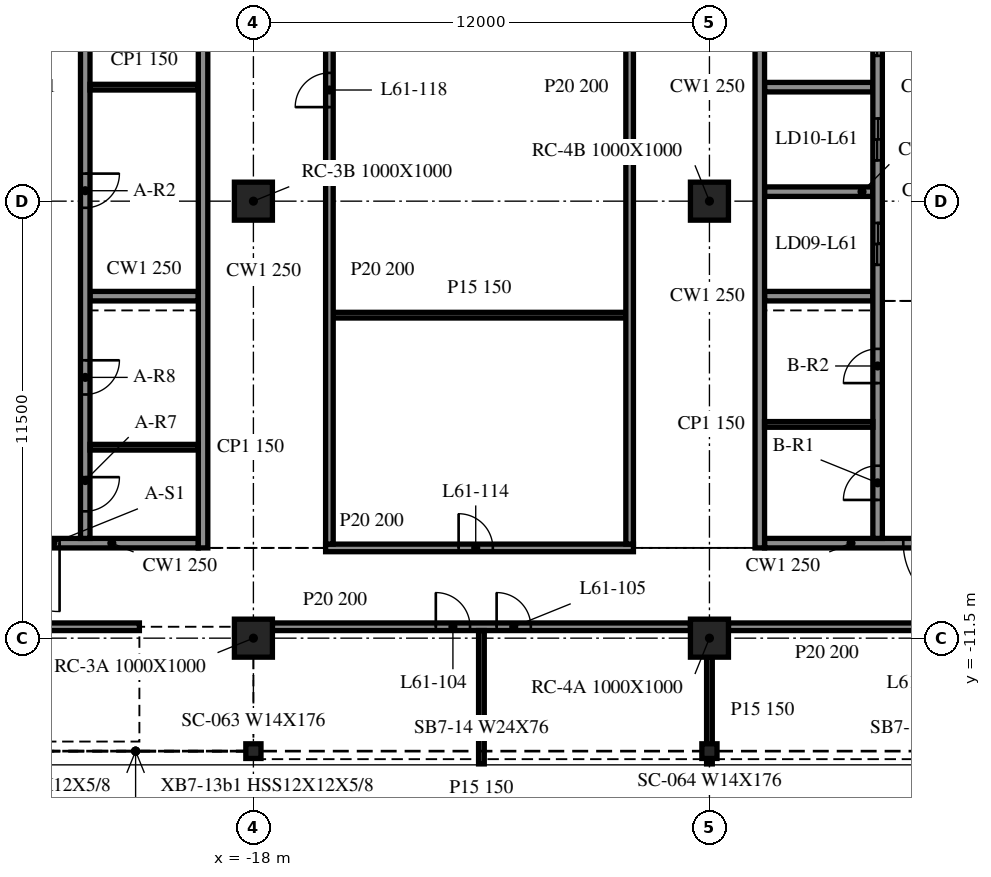
"""IFC4 building model, lengths in metres.
Left out: names, types, materials, properties, quantities, classifications, styles, units other than length and angle.
Written with IfcOpenShell. Run it as: python <this file> out.ifc"""

import sys

from ifc_helpers import new_model, si_unit, direction, frame, frame_2d, origin, origin_2d, place, context, subcontext, project, spatial, rectangle, i_section, extrude, element, fill, save


model = new_model("IFC4")
c1 = context("Model", 3, precision=1e-05, world=origin(), true_north=direction((0.0, 1.0)))
c2 = subcontext(c1, "Body", "Model", "MODEL_VIEW")
j1 = project(units=[si_unit("LENGTHUNIT", "METRE"), si_unit("PLANEANGLEUNIT", "RADIAN")], contexts=[c1])
p1 = place(None, origin())
s1 = spatial("IfcSite", under=j1, at=p1, CompositionType="ELEMENT")
p2 = place(p1, origin())
s2 = spatial("IfcBuilding", under=s1, at=p2, CompositionType="ELEMENT")
p3 = place(p2, frame((0.0, 0.0, 251.4)))
s3 = spatial("IfcBuildingStorey", under=s2, at=p3, CompositionType="ELEMENT", Elevation=251.4)
for number, where, z_axis, x_axis in (
    (1, (-18.0, -11.5, -0.34), (0.0, 0.0, 1.0), (1.0, 0.0, 0.0)),
    (2, (-18.0, 0.0, -0.34), (0.0, 0.0, 1.0), (1.0, 0.0, 0.0)),
    (3, (-6.0, -11.5, -0.34), (0.0, 0.0, 1.0), (1.0, 0.0, 0.0)),
    (4, (-6.0, 0.0, -0.34), (0.0, 0.0, 1.0), (1.0, 0.0, 0.0)),
):
    element("IfcColumn", number, at=place(p3, frame(where, z_axis=z_axis, x_axis=x_axis)), inside=s3, PredefinedType="COLUMN", context=c2, shape_type="SweptSolid", body=[
        extrude(rectangle(XDim=1.0, YDim=1.0, at=origin_2d()), origin(), (0.0, 0.0, 1.0), 3.8),
    ])
for number, where, z_axis, x_axis in (
    (5, (-18.0, -14.473, -0.34), (0.0, 0.0, 1.0), (1.0, 0.0, 0.0)),
    (6, (-6.0, -14.473, -0.34), (0.0, 0.0, 1.0), (1.0, 0.0, 0.0)),
):
    element("IfcColumn", number, at=place(p3, frame(where, z_axis=z_axis, x_axis=x_axis)), inside=s3, PredefinedType="COLUMN", context=c2, shape_type="SweptSolid", body=[
        extrude(i_section(OverallWidth=0.399, OverallDepth=0.386, WebThickness=0.021, FlangeThickness=0.033, at=origin_2d()), origin(), (0.0, 0.0, 1.0), 3.8),
    ])
p4 = place(p3, frame((-19.325, -9.125, 0.0), z_axis=(0.0, 0.0, 1.0), x_axis=(0.0, 1.0, 0.0)))
e7 = element("IfcWall", 7, at=p4, inside=s3, PredefinedType="SOLIDWALL", context=c2, shape_type="SweptSolid", body=[
    extrude(rectangle(XDim=24.25, YDim=0.25, at=frame_2d((12.125, 0.0))), origin(), (0.0, 0.0, 1.0), 3.46),
])
p5 = place(p3, frame((-19.45, -9.0, 0.0), z_axis=(0.0, 0.0, 1.0), x_axis=(-1.0, 0.0, 0.0)))
e8 = element("IfcWall", 8, at=p5, inside=s3, PredefinedType="SOLIDWALL", context=c2, shape_type="SweptSolid", body=[
    extrude(rectangle(XDim=9.1, YDim=0.25, at=frame_2d((4.55, 0.0))), origin(), (0.0, 0.0, 1.0), 3.46),
])
p6 = place(p5, frame((3.65, 0.0, 0.0)))
e9 = element("IfcOpeningElement", 9, at=p6, cuts=e8, PredefinedType="OPENING", context=c2, shape_type="SweptSolid", body=[
    extrude(rectangle(XDim=1.8, YDim=2.1, at=frame_2d((0.9, 1.05))), frame((0.0, 0.135, 0.0), z_axis=(0.0, -1.0, 0.0), x_axis=(1.0, 0.0, 0.0)), (0.0, 0.0, 1.0), 0.27),
])
p7 = place(p3, frame((-22.425, 14.875, 0.0), z_axis=(0.0, 0.0, 1.0), x_axis=(0.0, -1.0, 0.0)))
e10 = element("IfcWall", 10, at=p7, inside=s3, PredefinedType="SOLIDWALL", context=c2, shape_type="SweptSolid", body=[
    extrude(rectangle(XDim=23.75, YDim=0.25, at=frame_2d((11.875, 0.0))), origin(), (0.0, 0.0, 1.0), 3.46),
])
p8 = place(p7, frame((14.15, 0.0, 0.0)))
e11 = element("IfcOpeningElement", 11, at=p8, cuts=e10, PredefinedType="OPENING", context=c2, shape_type="SweptSolid", body=[
    extrude(rectangle(XDim=0.9, YDim=2.1, at=frame_2d((0.45, 1.05))), frame((0.0, 0.135, 0.0), z_axis=(0.0, -1.0, 0.0), x_axis=(1.0, 0.0, 0.0)), (0.0, 0.0, 1.0), 0.27),
])
p9 = place(p7, frame((8.7, 0.0, 0.0)))
e12 = element("IfcOpeningElement", 12, at=p9, cuts=e10, PredefinedType="OPENING", context=c2, shape_type="SweptSolid", body=[
    extrude(rectangle(XDim=0.9, YDim=2.1, at=frame_2d((0.45, 1.05))), frame((0.0, 0.135, 0.0), z_axis=(0.0, -1.0, 0.0), x_axis=(1.0, 0.0, 0.0)), (0.0, 0.0, 1.0), 0.27),
])
p10 = place(p7, frame((22.137, 0.0, 0.0)))
e13 = element("IfcOpeningElement", 13, at=p10, cuts=e10, PredefinedType="OPENING", context=c2, shape_type="SweptSolid", body=[
    extrude(rectangle(XDim=0.9, YDim=2.1, at=frame_2d((0.45, 1.05))), frame((0.0, 0.135, 0.0), z_axis=(0.0, -1.0, 0.0), x_axis=(1.0, 0.0, 0.0)), (0.0, 0.0, 1.0), 0.27),
])
p11 = place(p7, frame((19.062, 0.0, 0.0)))
e14 = element("IfcOpeningElement", 14, at=p11, cuts=e10, PredefinedType="OPENING", context=c2, shape_type="SweptSolid", body=[
    extrude(rectangle(XDim=0.9, YDim=2.1, at=frame_2d((0.45, 1.05))), frame((0.0, 0.135, 0.0), z_axis=(0.0, -1.0, 0.0), x_axis=(1.0, 0.0, 0.0)), (0.0, 0.0, 1.0), 0.27),
])
p12 = place(p7, frame((2.55, 0.0, 0.0)))
e15 = element("IfcOpeningElement", 15, at=p12, cuts=e10, PredefinedType="OPENING", context=c2, shape_type="SweptSolid", body=[
    extrude(rectangle(XDim=0.9, YDim=2.1, at=frame_2d((0.45, 1.05))), frame((0.0, 0.135, 0.0), z_axis=(0.0, -1.0, 0.0), x_axis=(1.0, 0.0, 0.0)), (0.0, 0.0, 1.0), 0.27),
])
p13 = place(p3, frame((-22.3, -2.5, 0.0), z_axis=(0.0, 0.0, 1.0), x_axis=(1.0, 0.0, 0.0)))
e16 = element("IfcWall", 16, at=p13, inside=s3, PredefinedType="SOLIDWALL", context=c2, shape_type="SweptSolid", body=[
    extrude(rectangle(XDim=2.85, YDim=0.25, at=frame_2d((1.425, 0.0))), origin(), (0.0, 0.0, 1.0), 3.46),
])
for number, where, z_axis, x_axis in (
    (17, (-22.3, 3.0, 0.0), (0.0, 0.0, 1.0), (1.0, 0.0, 0.0)),
    (18, (-22.3, -6.475, 0.0), (0.0, 0.0, 1.0), (1.0, 0.0, 0.0)),
):
    element("IfcWall", number, at=place(p3, frame(where, z_axis=z_axis, x_axis=x_axis)), inside=s3, PredefinedType="PARTITIONING", context=c2, shape_type="SweptSolid", body=[
        extrude(rectangle(XDim=2.85, YDim=0.15, at=frame_2d((1.425, 0.0))), origin(), (0.0, 0.0, 1.0), 3.46),
    ])
p14 = place(p3, frame((-4.675, 15.125, 0.0), z_axis=(0.0, 0.0, 1.0), x_axis=(0.0, -1.0, 0.0)))
e19 = element("IfcWall", 19, at=p14, inside=s3, PredefinedType="SOLIDWALL", context=c2, shape_type="SweptSolid", body=[
    extrude(rectangle(XDim=24.25, YDim=0.25, at=frame_2d((12.125, 0.0))), origin(), (0.0, 0.0, 1.0), 3.46),
])
p15 = place(p3, frame((4.55, -9.0, 0.0), z_axis=(0.0, 0.0, 1.0), x_axis=(-1.0, 0.0, 0.0)))
e20 = element("IfcWall", 20, at=p15, inside=s3, PredefinedType="SOLIDWALL", context=c2, shape_type="SweptSolid", body=[
    extrude(rectangle(XDim=9.1, YDim=0.25, at=frame_2d((4.55, 0.0))), origin(), (0.0, 0.0, 1.0), 3.46),
])
p16 = place(p15, frame((3.65, 0.0, 0.0)))
e21 = element("IfcOpeningElement", 21, at=p16, cuts=e20, PredefinedType="OPENING", context=c2, shape_type="SweptSolid", body=[
    extrude(rectangle(XDim=1.8, YDim=2.1, at=frame_2d((0.9, 1.05))), frame((0.0, 0.135, 0.0), z_axis=(0.0, -1.0, 0.0), x_axis=(1.0, 0.0, 0.0)), (0.0, 0.0, 1.0), 0.27),
])
p17 = place(p3, frame((-1.575, -8.875, 0.0), z_axis=(0.0, 0.0, 1.0), x_axis=(0.0, 1.0, 0.0)))
e22 = element("IfcWall", 22, at=p17, inside=s3, PredefinedType="SOLIDWALL", context=c2, shape_type="SweptSolid", body=[
    extrude(rectangle(XDim=23.75, YDim=0.25, at=frame_2d((11.875, 0.0))), origin(), (0.0, 0.0, 1.0), 3.46),
])
p18 = place(p17, frame((7.2, 0.0, 0.0)))
e23 = element("IfcOpeningElement", 23, at=p18, cuts=e22, PredefinedType="OPENING", context=c2, shape_type="SweptSolid", body=[
    extrude(rectangle(XDim=1.1, YDim=2.1, at=frame_2d((0.55, 1.05))), frame((0.0, 0.135, 0.0), z_axis=(0.0, -1.0, 0.0), x_axis=(1.0, 0.0, 0.0)), (0.0, 0.0, 1.0), 0.27),
])
p19 = place(p17, frame((9.95, 0.0, 0.0)))
e24 = element("IfcOpeningElement", 24, at=p19, cuts=e22, PredefinedType="OPENING", context=c2, shape_type="SweptSolid", body=[
    extrude(rectangle(XDim=1.1, YDim=2.1, at=frame_2d((0.55, 1.05))), frame((0.0, 0.135, 0.0), z_axis=(0.0, -1.0, 0.0), x_axis=(1.0, 0.0, 0.0)), (0.0, 0.0, 1.0), 0.27),
])
p20 = place(p17, frame((12.7, 0.0, 0.0)))
e25 = element("IfcOpeningElement", 25, at=p20, cuts=e22, PredefinedType="OPENING", context=c2, shape_type="SweptSolid", body=[
    extrude(rectangle(XDim=1.1, YDim=2.1, at=frame_2d((0.55, 1.05))), frame((0.0, 0.135, 0.0), z_axis=(0.0, -1.0, 0.0), x_axis=(1.0, 0.0, 0.0)), (0.0, 0.0, 1.0), 0.27),
])
p21 = place(p17, frame((15.45, 0.0, 0.0)))
e26 = element("IfcOpeningElement", 26, at=p21, cuts=e22, PredefinedType="OPENING", context=c2, shape_type="SweptSolid", body=[
    extrude(rectangle(XDim=1.1, YDim=2.1, at=frame_2d((0.55, 1.05))), frame((0.0, 0.135, 0.0), z_axis=(0.0, -1.0, 0.0), x_axis=(1.0, 0.0, 0.0)), (0.0, 0.0, 1.0), 0.27),
])
p22 = place(p17, frame((1.012, 0.0, 0.0)))
e27 = element("IfcOpeningElement", 27, at=p22, cuts=e22, PredefinedType="OPENING", context=c2, shape_type="SweptSolid", body=[
    extrude(rectangle(XDim=0.9, YDim=2.1, at=frame_2d((0.45, 1.05))), frame((0.0, 0.135, 0.0), z_axis=(0.0, -1.0, 0.0), x_axis=(1.0, 0.0, 0.0)), (0.0, 0.0, 1.0), 0.27),
])
p23 = place(p17, frame((4.087, 0.0, 0.0)))
e28 = element("IfcOpeningElement", 28, at=p23, cuts=e22, PredefinedType="OPENING", context=c2, shape_type="SweptSolid", body=[
    extrude(rectangle(XDim=0.9, YDim=2.1, at=frame_2d((0.45, 1.05))), frame((0.0, 0.135, 0.0), z_axis=(0.0, -1.0, 0.0), x_axis=(1.0, 0.0, 0.0)), (0.0, 0.0, 1.0), 0.27),
])
p24 = place(p17, frame((18.262, 0.0, 0.0)))
e29 = element("IfcOpeningElement", 29, at=p24, cuts=e22, PredefinedType="OPENING", context=c2, shape_type="SweptSolid", body=[
    extrude(rectangle(XDim=0.9, YDim=2.1, at=frame_2d((0.45, 1.05))), frame((0.0, 0.135, 0.0), z_axis=(0.0, -1.0, 0.0), x_axis=(1.0, 0.0, 0.0)), (0.0, 0.0, 1.0), 0.27),
])
p25 = place(p17, frame((20.3, 0.0, 0.0)))
e30 = element("IfcOpeningElement", 30, at=p25, cuts=e22, PredefinedType="OPENING", context=c2, shape_type="SweptSolid", body=[
    extrude(rectangle(XDim=0.9, YDim=2.1, at=frame_2d((0.45, 1.05))), frame((0.0, 0.135, 0.0), z_axis=(0.0, -1.0, 0.0), x_axis=(1.0, 0.0, 0.0)), (0.0, 0.0, 1.0), 0.27),
])
p26 = place(p17, frame((22.337, 0.0, 0.0)))
e31 = element("IfcOpeningElement", 31, at=p26, cuts=e22, PredefinedType="OPENING", context=c2, shape_type="SweptSolid", body=[
    extrude(rectangle(XDim=0.9, YDim=2.1, at=frame_2d((0.45, 1.05))), frame((0.0, 0.135, 0.0), z_axis=(0.0, -1.0, 0.0), x_axis=(1.0, 0.0, 0.0)), (0.0, 0.0, 1.0), 0.27),
])
for number, where, z_axis, x_axis in (
    (32, (-4.55, -2.5, 0.0), (0.0, 0.0, 1.0), (1.0, 0.0, 0.0)),
    (33, (-4.55, 0.25, 0.0), (0.0, 0.0, 1.0), (1.0, 0.0, 0.0)),
    (34, (-4.55, 3.0, 0.0), (0.0, 0.0, 1.0), (1.0, 0.0, 0.0)),
):
    element("IfcWall", number, at=place(p3, frame(where, z_axis=z_axis, x_axis=x_axis)), inside=s3, PredefinedType="SOLIDWALL", context=c2, shape_type="SweptSolid", body=[
        extrude(rectangle(XDim=2.85, YDim=0.25, at=frame_2d((1.425, 0.0))), origin(), (0.0, 0.0, 1.0), 3.46),
    ])
p27 = place(p3, frame((-4.55, -5.875, 0.0), z_axis=(0.0, 0.0, 1.0), x_axis=(1.0, 0.0, 0.0)))
e35 = element("IfcWall", 35, at=p27, inside=s3, PredefinedType="PARTITIONING", context=c2, shape_type="SweptSolid", body=[
    extrude(rectangle(XDim=2.85, YDim=0.15, at=frame_2d((1.425, 0.0))), origin(), (0.0, 0.0, 1.0), 3.46),
])
p28 = place(p3, frame((-29.5, -11.2, 0.0), z_axis=(0.0, 0.0, 1.0), x_axis=(1.0, 0.0, 0.0)))
e36 = element("IfcWall", 36, at=p28, inside=s3, PredefinedType="PARTITIONING", context=c2, shape_type="SweptSolid", body=[
    extrude(rectangle(XDim=8.5, YDim=0.2, at=frame_2d((4.25, 0.0))), origin(), (0.0, 0.0, 1.0), 3.46),
])
p29 = place(p28, frame((3.7, 0.0, 0.0)))
e37 = element("IfcOpeningElement", 37, at=p29, cuts=e36, PredefinedType="OPENING", context=c2, shape_type="SweptSolid", body=[
    extrude(rectangle(XDim=0.9, YDim=2.1, at=frame_2d((0.45, 1.05))), frame((0.0, 0.11, 0.0), z_axis=(0.0, -1.0, 0.0), x_axis=(1.0, 0.0, 0.0)), (0.0, 0.0, 1.0), 0.22),
])
p30 = place(p3, frame((-17.5, -11.2, 0.0), z_axis=(0.0, 0.0, 1.0), x_axis=(1.0, 0.0, 0.0)))
e38 = element("IfcWall", 38, at=p30, inside=s3, PredefinedType="PARTITIONING", context=c2, shape_type="SweptSolid", body=[
    extrude(rectangle(XDim=11.0, YDim=0.2, at=frame_2d((5.5, 0.0))), origin(), (0.0, 0.0, 1.0), 3.46),
])
p31 = place(p30, frame((4.3, 0.0, 0.0)))
e39 = element("IfcOpeningElement", 39, at=p31, cuts=e38, PredefinedType="OPENING", context=c2, shape_type="SweptSolid", body=[
    extrude(rectangle(XDim=0.9, YDim=2.1, at=frame_2d((0.45, 1.05))), frame((0.0, 0.11, 0.0), z_axis=(0.0, -1.0, 0.0), x_axis=(1.0, 0.0, 0.0)), (0.0, 0.0, 1.0), 0.22),
])
p32 = place(p30, frame((5.9, 0.0, 0.0)))
e40 = element("IfcOpeningElement", 40, at=p32, cuts=e38, PredefinedType="OPENING", context=c2, shape_type="SweptSolid", body=[
    extrude(rectangle(XDim=0.9, YDim=2.1, at=frame_2d((0.45, 1.05))), frame((0.0, 0.11, 0.0), z_axis=(0.0, -1.0, 0.0), x_axis=(1.0, 0.0, 0.0)), (0.0, 0.0, 1.0), 0.22),
])
p33 = place(p3, frame((-5.5, -11.2, 0.0), z_axis=(0.0, 0.0, 1.0), x_axis=(1.0, 0.0, 0.0)))
e41 = element("IfcWall", 41, at=p33, inside=s3, PredefinedType="PARTITIONING", context=c2, shape_type="SweptSolid", body=[
    extrude(rectangle(XDim=11.0, YDim=0.2, at=frame_2d((5.5, 0.0))), origin(), (0.0, 0.0, 1.0), 3.46),
])
p34 = place(p33, frame((5.1, 0.0, 0.0)))
e42 = element("IfcOpeningElement", 42, at=p34, cuts=e41, PredefinedType="OPENING", context=c2, shape_type="SweptSolid", body=[
    extrude(rectangle(XDim=0.9, YDim=2.1, at=frame_2d((0.45, 1.05))), frame((0.0, 0.11, 0.0), z_axis=(0.0, -1.0, 0.0), x_axis=(1.0, 0.0, 0.0)), (0.0, 0.0, 1.0), 0.22),
])
p35 = place(p33, frame((8.9, 0.0, 0.0)))
e43 = element("IfcOpeningElement", 43, at=p35, cuts=e41, PredefinedType="OPENING", context=c2, shape_type="SweptSolid", body=[
    extrude(rectangle(XDim=0.9, YDim=2.1, at=frame_2d((0.45, 1.05))), frame((0.0, 0.11, 0.0), z_axis=(0.0, -1.0, 0.0), x_axis=(1.0, 0.0, 0.0)), (0.0, 0.0, 1.0), 0.22),
])
p36 = place(p3, frame((-16.1, -9.125, 0.0), z_axis=(0.0, 0.0, 1.0), x_axis=(1.0, 0.0, 0.0)))
e44 = element("IfcWall", 44, at=p36, inside=s3, PredefinedType="PARTITIONING", context=c2, shape_type="SweptSolid", body=[
    extrude(rectangle(XDim=8.1, YDim=0.2, at=frame_2d((4.05, 0.0))), origin(), (0.0, 0.0, 1.0), 3.46),
])
p37 = place(p36, frame((3.5, 0.0, 0.0)))
e45 = element("IfcOpeningElement", 45, at=p37, cuts=e44, PredefinedType="OPENING", context=c2, shape_type="SweptSolid", body=[
    extrude(rectangle(XDim=0.9, YDim=2.1, at=frame_2d((0.45, 1.05))), frame((0.0, 0.11, 0.0), z_axis=(0.0, -1.0, 0.0), x_axis=(1.0, 0.0, 0.0)), (0.0, 0.0, 1.0), 0.22),
])
p38 = place(p3, frame((-15.9, -3.0, 0.0), z_axis=(0.0, 0.0, 1.0), x_axis=(1.0, 0.0, 0.0)))
e46 = element("IfcWall", 46, at=p38, inside=s3, PredefinedType="PARTITIONING", context=c2, shape_type="SweptSolid", body=[
    extrude(rectangle(XDim=7.7, YDim=0.15, at=frame_2d((3.85, 0.0))), origin(), (0.0, 0.0, 1.0), 3.46),
])
p39 = place(p3, frame((-16.0, -9.025, 0.0), z_axis=(0.0, 0.0, 1.0), x_axis=(0.0, 1.0, 0.0)))
e47 = element("IfcWall", 47, at=p39, inside=s3, PredefinedType="PARTITIONING", context=c2, shape_type="SweptSolid", body=[
    extrude(rectangle(XDim=24.05, YDim=0.2, at=frame_2d((12.025, 0.0))), origin(), (0.0, 0.0, 1.0), 3.46),
])
p40 = place(p39, frame((11.5, 0.0, 0.0)))
e48 = element("IfcOpeningElement", 48, at=p40, cuts=e47, PredefinedType="OPENING", context=c2, shape_type="SweptSolid", body=[
    extrude(rectangle(XDim=0.9, YDim=2.1, at=frame_2d((0.45, 1.05))), frame((0.0, 0.11, 0.0), z_axis=(0.0, -1.0, 0.0), x_axis=(1.0, 0.0, 0.0)), (0.0, 0.0, 1.0), 0.22),
])
p41 = place(p3, frame((-12.0, -14.809, 0.0), z_axis=(0.0, 0.0, 1.0), x_axis=(0.0, 1.0, 0.0)))
e49 = element("IfcWall", 49, at=p41, inside=s3, PredefinedType="PARTITIONING", context=c2, shape_type="SweptSolid", body=[
    extrude(rectangle(XDim=3.509, YDim=0.15, at=frame_2d((1.754, 0.0))), origin(), (0.0, 0.0, 1.0), 3.46),
])
p42 = place(p3, frame((-8.1, -9.025, 0.0), z_axis=(0.0, 0.0, 1.0), x_axis=(0.0, 1.0, 0.0)))
e50 = element("IfcWall", 50, at=p42, inside=s3, PredefinedType="PARTITIONING", context=c2, shape_type="SweptSolid", body=[
    extrude(rectangle(XDim=24.05, YDim=0.2, at=frame_2d((12.025, 0.0))), origin(), (0.0, 0.0, 1.0), 3.46),
])
p43 = place(p3, frame((-6.0, -14.809, 0.0), z_axis=(0.0, 0.0, 1.0), x_axis=(0.0, 1.0, 0.0)))
e51 = element("IfcWall", 51, at=p43, inside=s3, PredefinedType="PARTITIONING", context=c2, shape_type="SweptSolid", body=[
    extrude(rectangle(XDim=2.809, YDim=0.15, at=frame_2d((1.405, 0.0))), origin(), (0.0, 0.0, 1.0), 3.46),
])
p44 = place(p6, origin())
e52 = element("IfcDoor", 52, at=p44, inside=s3, OperationType="DOUBLE_DOOR_SINGLE_SWING", PredefinedType="DOOR", context=c2, shape_type="SweptSolid", body=[
    extrude(rectangle(XDim=1.8, YDim=2.1, at=frame_2d((0.9, 1.05))), frame((0.0, 0.025, 0.0), z_axis=(0.0, -1.0, 0.0), x_axis=(1.0, 0.0, 0.0)), (0.0, 0.0, 1.0), 0.05),
])
fill(e9, e52)
p45 = place(p8, origin())
e53 = element("IfcDoor", 53, at=p45, inside=s3, OperationType="SINGLE_SWING_RIGHT", PredefinedType="DOOR", context=c2, shape_type="SweptSolid", body=[
    extrude(rectangle(XDim=0.9, YDim=2.1, at=frame_2d((0.45, 1.05))), frame((0.0, 0.025, 0.0), z_axis=(0.0, -1.0, 0.0), x_axis=(1.0, 0.0, 0.0)), (0.0, 0.0, 1.0), 0.05),
])
fill(e11, e53)
p46 = place(p10, origin())
e54 = element("IfcDoor", 54, at=p46, inside=s3, OperationType="SINGLE_SWING_LEFT", PredefinedType="DOOR", context=c2, shape_type="SweptSolid", body=[
    extrude(rectangle(XDim=0.9, YDim=2.1, at=frame_2d((0.45, 1.05))), frame((0.0, 0.025, 0.0), z_axis=(0.0, -1.0, 0.0), x_axis=(1.0, 0.0, 0.0)), (0.0, 0.0, 1.0), 0.05),
])
fill(e13, e54)
p47 = place(p11, origin())
e55 = element("IfcDoor", 55, at=p47, inside=s3, OperationType="SINGLE_SWING_RIGHT", PredefinedType="DOOR", context=c2, shape_type="SweptSolid", body=[
    extrude(rectangle(XDim=0.9, YDim=2.1, at=frame_2d((0.45, 1.05))), frame((0.0, 0.025, 0.0), z_axis=(0.0, -1.0, 0.0), x_axis=(1.0, 0.0, 0.0)), (0.0, 0.0, 1.0), 0.05),
])
fill(e14, e55)
p48 = place(p16, origin())
e56 = element("IfcDoor", 56, at=p48, inside=s3, OperationType="DOUBLE_DOOR_SINGLE_SWING", PredefinedType="DOOR", context=c2, shape_type="SweptSolid", body=[
    extrude(rectangle(XDim=1.8, YDim=2.1, at=frame_2d((0.9, 1.05))), frame((0.0, 0.025, 0.0), z_axis=(0.0, -1.0, 0.0), x_axis=(1.0, 0.0, 0.0)), (0.0, 0.0, 1.0), 0.05),
])
fill(e21, e56)
p49 = place(p18, origin())
e57 = element("IfcDoor", 57, at=p49, inside=s3, OperationType="DOUBLE_DOOR_SLIDING", PredefinedType="DOOR", context=c2, shape_type="SweptSolid", body=[
    extrude(rectangle(XDim=1.1, YDim=2.1, at=frame_2d((0.55, 1.05))), frame((0.0, 0.025, 0.0), z_axis=(0.0, -1.0, 0.0), x_axis=(1.0, 0.0, 0.0)), (0.0, 0.0, 1.0), 0.05),
])
fill(e23, e57)
p50 = place(p19, origin())
e58 = element("IfcDoor", 58, at=p50, inside=s3, OperationType="DOUBLE_DOOR_SLIDING", PredefinedType="DOOR", context=c2, shape_type="SweptSolid", body=[
    extrude(rectangle(XDim=1.1, YDim=2.1, at=frame_2d((0.55, 1.05))), frame((0.0, 0.025, 0.0), z_axis=(0.0, -1.0, 0.0), x_axis=(1.0, 0.0, 0.0)), (0.0, 0.0, 1.0), 0.05),
])
fill(e24, e58)
p51 = place(p20, origin())
e59 = element("IfcDoor", 59, at=p51, inside=s3, OperationType="DOUBLE_DOOR_SLIDING", PredefinedType="DOOR", context=c2, shape_type="SweptSolid", body=[
    extrude(rectangle(XDim=1.1, YDim=2.1, at=frame_2d((0.55, 1.05))), frame((0.0, 0.025, 0.0), z_axis=(0.0, -1.0, 0.0), x_axis=(1.0, 0.0, 0.0)), (0.0, 0.0, 1.0), 0.05),
])
fill(e25, e59)
p52 = place(p22, origin())
e60 = element("IfcDoor", 60, at=p52, inside=s3, OperationType="SINGLE_SWING_LEFT", PredefinedType="DOOR", context=c2, shape_type="SweptSolid", body=[
    extrude(rectangle(XDim=0.9, YDim=2.1, at=frame_2d((0.45, 1.05))), frame((0.0, 0.025, 0.0), z_axis=(0.0, -1.0, 0.0), x_axis=(1.0, 0.0, 0.0)), (0.0, 0.0, 1.0), 0.05),
])
fill(e27, e60)
p53 = place(p23, origin())
e61 = element("IfcDoor", 61, at=p53, inside=s3, OperationType="SINGLE_SWING_RIGHT", PredefinedType="DOOR", context=c2, shape_type="SweptSolid", body=[
    extrude(rectangle(XDim=0.9, YDim=2.1, at=frame_2d((0.45, 1.05))), frame((0.0, 0.025, 0.0), z_axis=(0.0, -1.0, 0.0), x_axis=(1.0, 0.0, 0.0)), (0.0, 0.0, 1.0), 0.05),
])
fill(e28, e61)
p54 = place(p31, origin())
e62 = element("IfcDoor", 62, at=p54, inside=s3, OperationType="SINGLE_SWING_RIGHT", PredefinedType="DOOR", context=c2, shape_type="SweptSolid", body=[
    extrude(rectangle(XDim=0.9, YDim=2.1, at=frame_2d((0.45, 1.05))), frame((0.0, 0.025, 0.0), z_axis=(0.0, -1.0, 0.0), x_axis=(1.0, 0.0, 0.0)), (0.0, 0.0, 1.0), 0.05),
])
fill(e39, e62)
p55 = place(p32, origin())
e63 = element("IfcDoor", 63, at=p55, inside=s3, OperationType="SINGLE_SWING_LEFT", PredefinedType="DOOR", context=c2, shape_type="SweptSolid", body=[
    extrude(rectangle(XDim=0.9, YDim=2.1, at=frame_2d((0.45, 1.05))), frame((0.0, 0.025, 0.0), z_axis=(0.0, -1.0, 0.0), x_axis=(1.0, 0.0, 0.0)), (0.0, 0.0, 1.0), 0.05),
])
fill(e40, e63)
p56 = place(p37, origin())
e64 = element("IfcDoor", 64, at=p56, inside=s3, OperationType="SINGLE_SWING_LEFT", PredefinedType="DOOR", context=c2, shape_type="SweptSolid", body=[
    extrude(rectangle(XDim=0.9, YDim=2.1, at=frame_2d((0.45, 1.05))), frame((0.0, 0.025, 0.0), z_axis=(0.0, -1.0, 0.0), x_axis=(1.0, 0.0, 0.0)), (0.0, 0.0, 1.0), 0.05),
])
fill(e45, e64)
p57 = place(p40, origin())
e65 = element("IfcDoor", 65, at=p57, inside=s3, OperationType="SINGLE_SWING_RIGHT", PredefinedType="DOOR", context=c2, shape_type="SweptSolid", body=[
    extrude(rectangle(XDim=0.9, YDim=2.1, at=frame_2d((0.45, 1.05))), frame((0.0, 0.025, 0.0), z_axis=(0.0, -1.0, 0.0), x_axis=(1.0, 0.0, 0.0)), (0.0, 0.0, 1.0), 0.05),
])
fill(e48, e65)
save(model, sys.argv[1])
